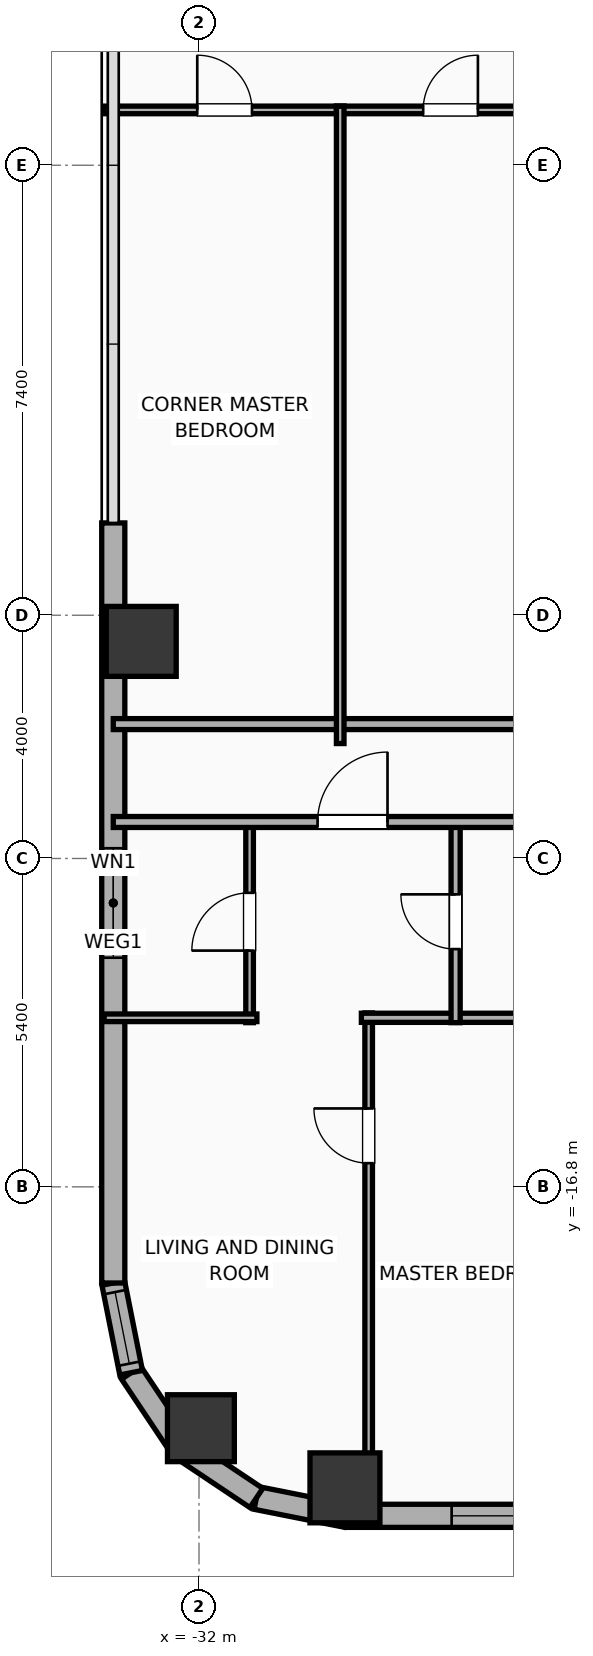
"""IFC4 building model, lengths in metres.
Left out: names, types, materials, properties, quantities, classifications, styles, units other than length and angle.
Written with IfcOpenShell. Run it as: python <this file> out.ifc"""

import sys

from ifc_helpers import new_model, si_unit, direction, frame, frame_2d, origin, origin_2d, place, context, subcontext, project, spatial, rectangle, hollow_rectangle, hollow_circle, extrude, element, fill, save


model = new_model("IFC4")
c1 = context("Model", 3, precision=1e-05, world=origin(), true_north=direction((0.0, 1.0)))
c2 = subcontext(c1, "Body", "Model", "MODEL_VIEW")
j1 = project(units=[si_unit("LENGTHUNIT", "METRE"), si_unit("PLANEANGLEUNIT", "RADIAN")], contexts=[c1])
p1 = place(None, origin())
s1 = spatial("IfcSite", under=j1, at=p1, CompositionType="ELEMENT")
p2 = place(p1, origin())
s2 = spatial("IfcBuilding", under=s1, at=p2, CompositionType="ELEMENT")
p3 = place(p2, frame((0.0, 0.0, 61.1)))
s3 = spatial("IfcBuildingStorey", under=s2, at=p3, CompositionType="ELEMENT", Elevation=61.1)
for number, where, z_axis, x_axis in (
    (1, (-29.6, -21.75, 0.0), (0.0, 0.0, 1.0), (1.0, 0.0, 0.0)),
    (2, (-32.95, -7.83, 0.0), (0.0, 0.0, 1.0), (1.0, 0.0, 0.0)),
):
    element("IfcColumn", number, at=place(p3, frame(where, z_axis=z_axis, x_axis=x_axis)), inside=s3, PredefinedType="COLUMN", context=c2, shape_type="SweptSolid", body=[
        extrude(hollow_rectangle(XDim=1.15, YDim=1.15, WallThickness=0.04, at=origin_2d()), origin(), (0.0, 0.0, 1.0), 3.9),
    ])
p4 = place(p3, frame((-31.969, -20.769, 0.0), z_axis=(0.0, 0.0, 1.0), x_axis=(1.0, 0.0, 0.0)))
e3 = element("IfcColumn", 3, at=p4, inside=s3, PredefinedType="COLUMN", context=c2, shape_type="SweptSolid", body=[
    extrude(hollow_circle(Radius=0.55, WallThickness=0.036, at=origin_2d()), origin(), (0.0, 0.0, 1.0), 3.9),
])
p5 = place(p3, frame((-11.914, -22.21, 0.0), z_axis=(0.0, 0.0, 1.0), x_axis=(-1.0, 0.0, 0.0)))
e4 = element("IfcWall", 4, at=p5, inside=s3, PredefinedType="ELEMENTEDWALL", context=c2, shape_type="SweptSolid", body=[
    extrude(rectangle(XDim=17.667, YDim=0.38, at=frame_2d((8.833, 0.0))), origin(), (0.0, 0.0, 1.0), 3.65),
])
p6 = place(p5, frame((8.484, 0.0, 0.75)))
e5 = element("IfcOpeningElement", 5, at=p6, cuts=e4, PredefinedType="OPENING", context=c2, shape_type="SweptSolid", body=[
    extrude(rectangle(XDim=2.4, YDim=2.1, at=frame_2d((1.2, 1.05))), frame((0.0, 0.2, 0.0), z_axis=(0.0, -1.0, 0.0), x_axis=(1.0, 0.0, 0.0)), (0.0, 0.0, 1.0), 0.4),
])
p7 = place(p5, frame((14.732, 0.0, 0.75)))
e6 = element("IfcOpeningElement", 6, at=p7, cuts=e4, PredefinedType="OPENING", context=c2, shape_type="SweptSolid", body=[
    extrude(rectangle(XDim=1.2, YDim=2.05, at=frame_2d((0.6, 1.025))), frame((0.0, 0.2, 0.0), z_axis=(0.0, -1.0, 0.0), x_axis=(1.0, 0.0, 0.0)), (0.0, 0.0, 1.0), 0.4),
])
p8 = place(p5, frame((12.181, 0.0, 0.75)))
e7 = element("IfcOpeningElement", 7, at=p8, cuts=e4, PredefinedType="OPENING", context=c2, shape_type="SweptSolid", body=[
    extrude(rectangle(XDim=1.2, YDim=2.05, at=frame_2d((0.6, 1.025))), frame((0.0, 0.2, 0.0), z_axis=(0.0, -1.0, 0.0), x_axis=(1.0, 0.0, 0.0)), (0.0, 0.0, 1.0), 0.4),
])
p9 = place(p5, frame((4.886, 0.0, 0.75)))
e8 = element("IfcOpeningElement", 8, at=p9, cuts=e4, PredefinedType="OPENING", context=c2, shape_type="SweptSolid", body=[
    extrude(rectangle(XDim=1.2, YDim=2.05, at=frame_2d((0.6, 1.025))), frame((0.0, 0.2, 0.0), z_axis=(0.0, -1.0, 0.0), x_axis=(1.0, 0.0, 0.0)), (0.0, 0.0, 1.0), 0.4),
])
p10 = place(p5, frame((1.188, 0.0, 0.75)))
e9 = element("IfcOpeningElement", 9, at=p10, cuts=e4, PredefinedType="OPENING", context=c2, shape_type="SweptSolid", body=[
    extrude(rectangle(XDim=1.2, YDim=2.05, at=frame_2d((0.6, 1.025))), frame((0.0, 0.2, 0.0), z_axis=(0.0, -1.0, 0.0), x_axis=(1.0, 0.0, 0.0)), (0.0, 0.0, 1.0), 0.4),
])
p11 = place(p3, frame((-29.581, -22.21, 0.0), z_axis=(0.0, 0.0, 1.0), x_axis=(-0.980786132421, 0.195086038585, 0.0)))
e10 = element("IfcWall", 10, at=p11, inside=s3, PredefinedType="ELEMENTEDWALL", context=c2, shape_type="SweptSolid", body=[
    extrude(rectangle(XDim=1.504, YDim=0.38, at=frame_2d((0.752, 0.0))), origin(), (0.0, 0.0, 1.0), 3.65),
])
p12 = place(p3, frame((-31.057, -21.917, 0.0), z_axis=(0.0, 0.0, 1.0), x_axis=(-0.831442848281, 0.555610286119, 0.0)))
e11 = element("IfcWall", 11, at=p12, inside=s3, PredefinedType="ELEMENTEDWALL", context=c2, shape_type="SweptSolid", body=[
    extrude(rectangle(XDim=1.485, YDim=0.38, at=frame_2d((0.743, 0.0))), origin(), (0.0, 0.0, 1.0), 3.65),
])
p13 = place(p3, frame((-32.292, -21.091, 0.0), z_axis=(0.0, 0.0, 1.0), x_axis=(-0.555572577804, 0.831468045563, 0.0)))
e12 = element("IfcWall", 12, at=p13, inside=s3, PredefinedType="ELEMENTEDWALL", context=c2, shape_type="SweptSolid", body=[
    extrude(rectangle(XDim=1.485, YDim=0.38, at=frame_2d((0.742, 0.0))), origin(), (0.0, 0.0, 1.0), 3.65),
])
p14 = place(p3, frame((-33.116, -19.857, 0.0), z_axis=(0.0, 0.0, 1.0), x_axis=(-0.195086038585, 0.980786132421, 0.0)))
e13 = element("IfcWall", 13, at=p14, inside=s3, PredefinedType="ELEMENTEDWALL", context=c2, shape_type="SweptSolid", body=[
    extrude(rectangle(XDim=1.504, YDim=0.38, at=frame_2d((0.752, 0.0))), origin(), (0.0, 0.0, 1.0), 3.65),
])
p15 = place(p14, frame((0.152, 0.0, 0.75)))
e14 = element("IfcOpeningElement", 14, at=p15, cuts=e13, PredefinedType="OPENING", context=c2, shape_type="SweptSolid", body=[
    extrude(rectangle(XDim=1.2, YDim=2.05, at=frame_2d((0.6, 1.025))), frame((0.0, 0.2, 0.0), z_axis=(0.0, -1.0, 0.0), x_axis=(1.0, 0.0, 0.0)), (0.0, 0.0, 1.0), 0.4),
])
p16 = place(p3, frame((-33.41, -18.381, 0.0), z_axis=(0.0, 0.0, 1.0), x_axis=(0.0, 1.0, 0.0)))
e15 = element("IfcWall", 15, at=p16, inside=s3, PredefinedType="ELEMENTEDWALL", context=c2, shape_type="SweptSolid", body=[
    extrude(rectangle(XDim=12.499, YDim=0.38, at=frame_2d((6.25, 0.0))), origin(), (0.0, 0.0, 1.0), 3.65),
])
p17 = place(p16, frame((5.35, 0.0, 0.75)))
e16 = element("IfcOpeningElement", 16, at=p17, cuts=e15, PredefinedType="OPENING", context=c2, shape_type="SweptSolid", body=[
    extrude(rectangle(XDim=1.8, YDim=2.1, at=frame_2d((0.9, 1.05))), frame((0.0, 0.2, 0.0), z_axis=(0.0, -1.0, 0.0), x_axis=(1.0, 0.0, 0.0)), (0.0, 0.0, 1.0), 0.4),
])
p18 = place(p3, frame((-33.41, -9.19, 0.0), z_axis=(0.0, 0.0, 1.0), x_axis=(1.0, 0.0, 0.0)))
e17 = element("IfcWall", 17, at=p18, inside=s3, PredefinedType="PARTITIONING", context=c2, shape_type="SweptSolid", body=[
    extrude(rectangle(XDim=23.53, YDim=0.18, at=frame_2d((11.765, 0.0))), origin(), (0.0, 0.0, 1.0), 3.65),
])
p19 = place(p3, frame((-29.21, -22.36, 0.0), z_axis=(0.0, 0.0, 1.0), x_axis=(0.0, 1.0, 0.0)))
e18 = element("IfcWall", 18, at=p19, inside=s3, PredefinedType="PARTITIONING", context=c2, shape_type="SweptSolid", body=[
    extrude(rectangle(XDim=8.42, YDim=0.125, at=frame_2d((4.21, 0.0))), origin(), (0.0, 0.0, 1.0), 3.65),
])
p20 = place(p19, frame((5.949, 0.0, 0.0)))
e19 = element("IfcOpeningElement", 19, at=p20, cuts=e18, PredefinedType="OPENING", context=c2, shape_type="SweptSolid", body=[
    extrude(rectangle(XDim=0.9, YDim=2.05, at=frame_2d((0.45, 1.025))), frame((0.0, 0.073, 0.0), z_axis=(0.0, -1.0, 0.0), x_axis=(1.0, 0.0, 0.0)), (0.0, 0.0, 1.0), 0.145),
])
p21 = place(p3, frame((-29.33, -14.02, 0.0), z_axis=(0.0, 0.0, 1.0), x_axis=(1.0, 0.0, 0.0)))
e20 = element("IfcWall", 20, at=p21, inside=s3, PredefinedType="PLUMBINGWALL", context=c2, shape_type="SweptSolid", body=[
    extrude(rectangle(XDim=3.79, YDim=0.15, at=frame_2d((1.895, 0.0))), origin(), (0.0, 0.0, 1.0), 3.65),
])
p22 = place(p3, frame((-31.168, -14.1, 0.0), z_axis=(0.0, 0.0, 1.0), x_axis=(0.0, 1.0, 0.0)))
e21 = element("IfcWall", 21, at=p22, inside=s3, PredefinedType="PARTITIONING", context=c2, shape_type="SweptSolid", body=[
    extrude(rectangle(XDim=3.32, YDim=0.125, at=frame_2d((1.66, 0.0))), origin(), (0.0, 0.0, 1.0), 2.94),
])
p23 = place(p22, frame((1.185, 0.0, 0.0)))
e22 = element("IfcOpeningElement", 22, at=p23, cuts=e21, PredefinedType="OPENING", context=c2, shape_type="SweptSolid", body=[
    extrude(rectangle(XDim=0.95, YDim=2.05, at=frame_2d((0.475, 1.025))), frame((0.0, 0.073, 0.0), z_axis=(0.0, -1.0, 0.0), x_axis=(1.0, 0.0, 0.0)), (0.0, 0.0, 1.0), 0.145),
])
p24 = place(p3, frame((-33.56, -14.02, 0.0), z_axis=(0.0, 0.0, 1.0), x_axis=(1.0, 0.0, 0.0)))
e23 = element("IfcWall", 23, at=p24, inside=s3, PredefinedType="PARTITIONING", context=c2, shape_type="SweptSolid", body=[
    extrude(rectangle(XDim=2.512, YDim=0.125, at=frame_2d((1.256, 0.0))), origin(), (0.0, 0.0, 1.0), 3.65),
])
p25 = place(p3, frame((-27.78, -14.1, 0.0), z_axis=(0.0, 0.0, 1.0), x_axis=(0.0, 1.0, 0.0)))
e24 = element("IfcWall", 24, at=p25, inside=s3, PredefinedType="PLUMBINGWALL", context=c2, shape_type="SweptSolid", body=[
    extrude(rectangle(XDim=3.32, YDim=0.15, at=frame_2d((1.66, 0.0))), origin(), (0.0, 0.0, 1.0), 3.65),
])
p26 = place(p25, frame((1.21, 0.0, 0.0)))
e25 = element("IfcOpeningElement", 25, at=p26, cuts=e24, PredefinedType="OPENING", context=c2, shape_type="SweptSolid", body=[
    extrude(rectangle(XDim=0.9, YDim=2.05, at=frame_2d((0.45, 1.025))), frame((0.0, 0.085, 0.0), z_axis=(0.0, -1.0, 0.0), x_axis=(1.0, 0.0, 0.0)), (0.0, 0.0, 1.0), 0.17),
])
p27 = place(p3, frame((-33.41, -10.8, 0.0), z_axis=(0.0, 0.0, 1.0), x_axis=(1.0, 0.0, 0.0)))
e26 = element("IfcWall", 26, at=p27, inside=s3, PredefinedType="PARTITIONING", context=c2, shape_type="SweptSolid", body=[
    extrude(rectangle(XDim=59.62, YDim=0.18, at=frame_2d((29.81, 0.0))), origin(), (0.0, 0.0, 1.0), 3.65),
])
p28 = place(p27, frame((3.36, 0.0, 0.0)))
e27 = element("IfcOpeningElement", 27, at=p28, cuts=e26, PredefinedType="OPENING", context=c2, shape_type="SweptSolid", body=[
    extrude(rectangle(XDim=1.15, YDim=2.05, at=frame_2d((0.575, 1.025))), frame((0.0, 0.1, 0.0), z_axis=(0.0, -1.0, 0.0), x_axis=(1.0, 0.0, 0.0)), (0.0, 0.0, 1.0), 0.2),
])
p29 = place(p27, frame((10.908, 0.0, 0.0)))
e28 = element("IfcOpeningElement", 28, at=p29, cuts=e26, PredefinedType="OPENING", context=c2, shape_type="SweptSolid", body=[
    extrude(rectangle(XDim=1.15, YDim=2.05, at=frame_2d((0.575, 1.025))), frame((0.0, 0.1, 0.0), z_axis=(0.0, -1.0, 0.0), x_axis=(1.0, 0.0, 0.0)), (0.0, 0.0, 1.0), 0.2),
])
p30 = place(p27, frame((15.755, 0.0, 0.0)))
e29 = element("IfcOpeningElement", 29, at=p30, cuts=e26, PredefinedType="OPENING", context=c2, shape_type="SweptSolid", body=[
    extrude(rectangle(XDim=0.9, YDim=2.05, at=frame_2d((0.45, 1.025))), frame((0.0, 0.1, 0.0), z_axis=(0.0, -1.0, 0.0), x_axis=(1.0, 0.0, 0.0)), (0.0, 0.0, 1.0), 0.2),
])
p31 = place(p27, frame((22.11, 0.0, 0.0)))
e30 = element("IfcOpeningElement", 30, at=p31, cuts=e26, PredefinedType="OPENING", context=c2, shape_type="SweptSolid", body=[
    extrude(rectangle(XDim=1.15, YDim=2.05, at=frame_2d((0.575, 1.025))), frame((0.0, 0.1, 0.0), z_axis=(0.0, -1.0, 0.0), x_axis=(1.0, 0.0, 0.0)), (0.0, 0.0, 1.0), 0.2),
])
p32 = place(p27, frame((27.709, 0.0, 0.0)))
e31 = element("IfcOpeningElement", 31, at=p32, cuts=e26, PredefinedType="OPENING", context=c2, shape_type="SweptSolid", body=[
    extrude(rectangle(XDim=1.15, YDim=2.05, at=frame_2d((0.575, 1.025))), frame((0.0, 0.1, 0.0), z_axis=(0.0, -1.0, 0.0), x_axis=(1.0, 0.0, 0.0)), (0.0, 0.0, 1.0), 0.2),
])
p33 = place(p27, frame((33.349, 0.0, 0.0)))
e32 = element("IfcOpeningElement", 32, at=p33, cuts=e26, PredefinedType="OPENING", context=c2, shape_type="SweptSolid", body=[
    extrude(rectangle(XDim=1.15, YDim=2.05, at=frame_2d((0.575, 1.025))), frame((0.0, 0.1, 0.0), z_axis=(0.0, -1.0, 0.0), x_axis=(1.0, 0.0, 0.0)), (0.0, 0.0, 1.0), 0.2),
])
p34 = place(p27, frame((36.759, 0.0, 0.0)))
e33 = element("IfcOpeningElement", 33, at=p34, cuts=e26, PredefinedType="OPENING", context=c2, shape_type="SweptSolid", body=[
    extrude(rectangle(XDim=1.15, YDim=2.05, at=frame_2d((0.575, 1.025))), frame((0.0, 0.1, 0.0), z_axis=(0.0, -1.0, 0.0), x_axis=(1.0, 0.0, 0.0)), (0.0, 0.0, 1.0), 0.2),
])
p35 = place(p27, frame((43.752, 0.0, 0.0)))
e34 = element("IfcOpeningElement", 34, at=p35, cuts=e26, PredefinedType="OPENING", context=c2, shape_type="SweptSolid", body=[
    extrude(rectangle(XDim=0.9, YDim=2.05, at=frame_2d((0.45, 1.025))), frame((0.0, 0.1, 0.0), z_axis=(0.0, -1.0, 0.0), x_axis=(1.0, 0.0, 0.0)), (0.0, 0.0, 1.0), 0.2),
])
p36 = place(p27, frame((47.962, 0.0, 0.0)))
e35 = element("IfcOpeningElement", 35, at=p36, cuts=e26, PredefinedType="OPENING", context=c2, shape_type="SweptSolid", body=[
    extrude(rectangle(XDim=1.15, YDim=2.05, at=frame_2d((0.575, 1.025))), frame((0.0, 0.1, 0.0), z_axis=(0.0, -1.0, 0.0), x_axis=(1.0, 0.0, 0.0)), (0.0, 0.0, 1.0), 0.2),
])
p37 = place(p27, frame((55.641, 0.0, 0.0)))
e36 = element("IfcOpeningElement", 36, at=p37, cuts=e26, PredefinedType="OPENING", context=c2, shape_type="SweptSolid", body=[
    extrude(rectangle(XDim=1.15, YDim=2.05, at=frame_2d((0.575, 1.025))), frame((0.0, 0.1, 0.0), z_axis=(0.0, -1.0, 0.0), x_axis=(1.0, 0.0, 0.0)), (0.0, 0.0, 1.0), 0.2),
])
p38 = place(p3, frame((-33.56, 0.91, 0.0), z_axis=(0.0, 0.0, 1.0), x_axis=(1.0, 0.0, 0.0)))
e37 = element("IfcWall", 37, at=p38, inside=s3, PredefinedType="PARTITIONING", context=c2, shape_type="SweptSolid", body=[
    extrude(rectangle(XDim=3.945, YDim=0.125, at=frame_2d((1.972, 0.0))), origin(), (0.0, 0.0, 1.0), 3.65),
])
p39 = place(p38, frame((1.531, 0.0, 0.0)))
e38 = element("IfcOpeningElement", 38, at=p39, cuts=e37, PredefinedType="OPENING", context=c2, shape_type="SweptSolid", body=[
    extrude(rectangle(XDim=0.9, YDim=2.05, at=frame_2d((0.45, 1.025))), frame((0.0, 0.073, 0.0), z_axis=(0.0, -1.0, 0.0), x_axis=(1.0, 0.0, 0.0)), (0.0, 0.0, 1.0), 0.145),
])
p40 = place(p3, frame((-29.74, 0.91, 0.0), z_axis=(0.0, 0.0, 1.0), x_axis=(1.0, 0.0, 0.0)))
e39 = element("IfcWall", 39, at=p40, inside=s3, PredefinedType="PARTITIONING", context=c2, shape_type="SweptSolid", body=[
    extrude(rectangle(XDim=3.754, YDim=0.125, at=frame_2d((1.877, 0.0))), origin(), (0.0, 0.0, 1.0), 3.65),
])
p41 = place(p40, frame((1.427, 0.0, 0.0)))
e40 = element("IfcOpeningElement", 40, at=p41, cuts=e39, PredefinedType="OPENING", context=c2, shape_type="SweptSolid", body=[
    extrude(rectangle(XDim=0.9, YDim=2.05, at=frame_2d((0.45, 1.025))), frame((0.0, 0.073, 0.0), z_axis=(0.0, -1.0, 0.0), x_axis=(1.0, 0.0, 0.0)), (0.0, 0.0, 1.0), 0.145),
])
p42 = place(p3, frame((-29.678, -9.51, 0.0), z_axis=(0.0, 0.0, 1.0), x_axis=(0.0, 1.0, 0.0)))
e41 = element("IfcWall", 41, at=p42, inside=s3, PredefinedType="PARTITIONING", context=c2, shape_type="SweptSolid", body=[
    extrude(rectangle(XDim=10.48, YDim=0.125, at=frame_2d((5.24, 0.0))), origin(), (0.0, 0.0, 1.0), 3.65),
])
p43 = place(p17, origin())
e42 = element("IfcWindow", 42, at=p43, inside=s3, PartitioningType="SINGLE_PANEL", PredefinedType="WINDOW", context=c2, shape_type="SweptSolid", body=[
    extrude(rectangle(XDim=1.8, YDim=2.1, at=frame_2d((0.9, 1.05))), frame((0.0, 0.03, 0.0), z_axis=(0.0, -1.0, 0.0), x_axis=(1.0, 0.0, 0.0)), (0.0, 0.0, 1.0), 0.06),
])
fill(e16, e42)
p44 = place(p15, origin())
e43 = element("IfcWindow", 43, at=p44, inside=s3, PartitioningType="SINGLE_PANEL", PredefinedType="WINDOW", context=c2, shape_type="SweptSolid", body=[
    extrude(rectangle(XDim=1.2, YDim=2.05, at=frame_2d((0.6, 1.025))), frame((0.0, 0.03, 0.0), z_axis=(0.0, -1.0, 0.0), x_axis=(1.0, 0.0, 0.0)), (0.0, 0.0, 1.0), 0.06),
])
fill(e14, e43)
p45 = place(p7, origin())
e44 = element("IfcWindow", 44, at=p45, inside=s3, PartitioningType="SINGLE_PANEL", PredefinedType="WINDOW", context=c2, shape_type="SweptSolid", body=[
    extrude(rectangle(XDim=1.2, YDim=2.05, at=frame_2d((0.6, 1.025))), frame((0.0, 0.03, 0.0), z_axis=(0.0, -1.0, 0.0), x_axis=(1.0, 0.0, 0.0)), (0.0, 0.0, 1.0), 0.06),
])
fill(e6, e44)
p46 = place(p20, origin())
e45 = element("IfcDoor", 45, at=p46, inside=s3, OperationType="SINGLE_SWING_RIGHT", PredefinedType="DOOR", context=c2, shape_type="SweptSolid", body=[
    extrude(rectangle(XDim=0.9, YDim=2.05, at=frame_2d((0.45, 1.025))), frame((0.0, 0.025, 0.0), z_axis=(0.0, -1.0, 0.0), x_axis=(1.0, 0.0, 0.0)), (0.0, 0.0, 1.0), 0.05),
])
fill(e19, e45)
p47 = place(p23, origin())
e46 = element("IfcDoor", 46, at=p47, inside=s3, OperationType="SINGLE_SWING_LEFT", PredefinedType="DOOR", context=c2, shape_type="SweptSolid", body=[
    extrude(rectangle(XDim=0.95, YDim=2.05, at=frame_2d((0.475, 1.025))), frame((0.0, 0.025, 0.0), z_axis=(0.0, -1.0, 0.0), x_axis=(1.0, 0.0, 0.0)), (0.0, 0.0, 1.0), 0.05),
])
fill(e22, e46)
p48 = place(p26, origin())
e47 = element("IfcDoor", 47, at=p48, inside=s3, OperationType="SINGLE_SWING_RIGHT", PredefinedType="DOOR", context=c2, shape_type="SweptSolid", body=[
    extrude(rectangle(XDim=0.9, YDim=2.05, at=frame_2d((0.45, 1.025))), frame((0.0, 0.025, 0.0), z_axis=(0.0, -1.0, 0.0), x_axis=(1.0, 0.0, 0.0)), (0.0, 0.0, 1.0), 0.05),
])
fill(e25, e47)
p49 = place(p28, origin())
e48 = element("IfcDoor", 48, at=p49, inside=s3, OperationType="SINGLE_SWING_RIGHT", PredefinedType="DOOR", context=c2, shape_type="SweptSolid", body=[
    extrude(rectangle(XDim=1.15, YDim=2.05, at=frame_2d((0.575, 1.025))), frame((0.0, 0.025, 0.0), z_axis=(0.0, -1.0, 0.0), x_axis=(1.0, 0.0, 0.0)), (0.0, 0.0, 1.0), 0.05),
])
fill(e27, e48)
p50 = place(p39, origin())
e49 = element("IfcDoor", 49, at=p50, inside=s3, OperationType="SINGLE_SWING_LEFT", PredefinedType="DOOR", context=c2, shape_type="SweptSolid", body=[
    extrude(rectangle(XDim=0.9, YDim=2.05, at=frame_2d((0.45, 1.025))), frame((0.0, 0.025, 0.0), z_axis=(0.0, -1.0, 0.0), x_axis=(1.0, 0.0, 0.0)), (0.0, 0.0, 1.0), 0.05),
])
fill(e38, e49)
p51 = place(p41, origin())
e50 = element("IfcDoor", 50, at=p51, inside=s3, OperationType="SINGLE_SWING_RIGHT", PredefinedType="DOOR", context=c2, shape_type="SweptSolid", body=[
    extrude(rectangle(XDim=0.9, YDim=2.05, at=frame_2d((0.45, 1.025))), frame((0.0, 0.025, 0.0), z_axis=(0.0, -1.0, 0.0), x_axis=(1.0, 0.0, 0.0)), (0.0, 0.0, 1.0), 0.05),
])
fill(e40, e50)
save(model, sys.argv[1])
